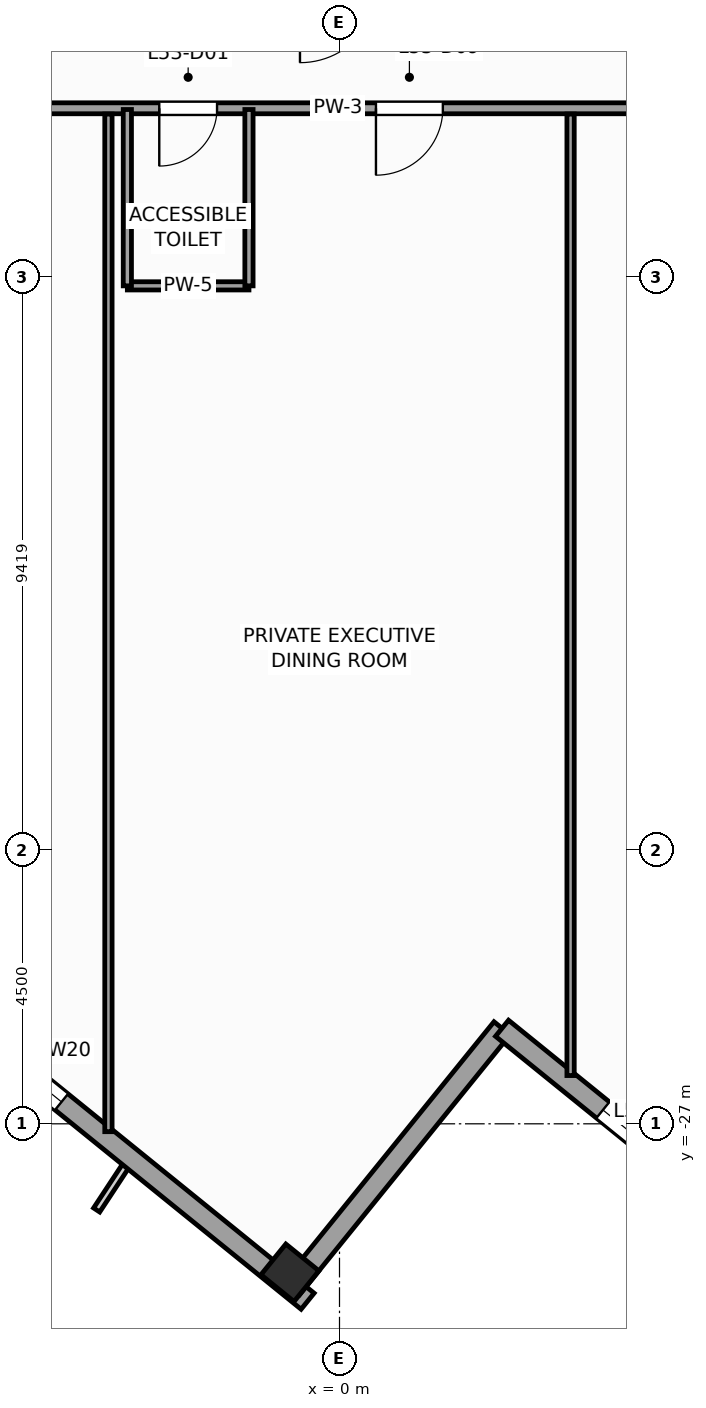
"""IFC4 building model, lengths in metres.
Left out: names, types, materials, properties, quantities, classifications, styles, units other than length and angle.
Written with IfcOpenShell. Run it as: python <this file> out.ifc"""

import sys

from ifc_helpers import new_model, si_unit, direction, frame, frame_2d, origin, origin_2d, place, context, subcontext, project, spatial, rectangle, extrude, source, transform, mapped, element, fill, save


model = new_model("IFC4")
c1 = context("Model", 3, precision=1e-05, world=origin(), true_north=direction((0.0, 1.0)))
c2 = subcontext(c1, "Body", "Model", "MODEL_VIEW")
j1 = project(units=[si_unit("LENGTHUNIT", "METRE"), si_unit("PLANEANGLEUNIT", "RADIAN")], contexts=[c1])
p1 = place(None, origin())
s1 = spatial("IfcSite", under=j1, at=p1, CompositionType="ELEMENT")
p2 = place(p1, origin())
s2 = spatial("IfcBuilding", under=s1, at=p2, CompositionType="ELEMENT")
p3 = place(p2, frame((0.0, 0.0, 221.2)))
s3 = spatial("IfcBuildingStorey", under=s2, at=p3, CompositionType="ELEMENT", Elevation=221.2)
m1 = source(origin(), c2, "Body", "SweptSolid", [
    extrude(rectangle(XDim=0.65, YDim=0.7, at=origin_2d()), origin(), (0.0, 0.0, 1.0), 3.9),
])
p4 = place(p3, frame((-0.815, -29.45, 0.0), z_axis=(0.0, 0.0, 1.0), x_axis=(0.62932039105, 0.777145961457, 0.0)))
e1 = element("IfcColumn", 1, at=p4, inside=s3, PredefinedType="COLUMN", context=c2, shape_type="MappedRepresentation", body=[
    mapped(m1, transform((0.0, 0.0, 0.0), scale=1.0)),
])
p5 = place(p3, frame((-29.154, -6.733, 0.0), z_axis=(0.0, 0.0, 1.0), x_axis=(0.77714192302, -0.629325378072, 0.0)))
e2 = element("IfcWall", 2, at=p5, inside=s3, PredefinedType="STANDARD", context=c2, shape_type="SweptSolid", body=[
    extrude(rectangle(XDim=36.84, YDim=0.34, at=frame_2d((18.42, 0.0))), origin(), (0.0, 0.0, 1.0), 2.96),
])
p6 = place(p5, frame((3.721, 0.0, 0.48)))
e3 = element("IfcOpeningElement", 3, at=p6, cuts=e2, PredefinedType="OPENING", context=c2, shape_type="SweptSolid", body=[
    extrude(rectangle(XDim=1.4, YDim=2.4, at=frame_2d((0.7, 1.2))), frame((0.0, 0.18, 0.0), z_axis=(0.0, -1.0, 0.0), x_axis=(1.0, 0.0, 0.0)), (0.0, 0.0, 1.0), 0.36),
])
p7 = place(p5, frame((9.809, 0.0, 0.58)))
e4 = element("IfcOpeningElement", 4, at=p7, cuts=e2, PredefinedType="OPENING", context=c2, shape_type="SweptSolid", body=[
    extrude(rectangle(XDim=1.75, YDim=2.3, at=frame_2d((0.875, 1.15))), frame((0.0, 0.18, 0.0), z_axis=(0.0, -1.0, 0.0), x_axis=(1.0, 0.0, 0.0)), (0.0, 0.0, 1.0), 0.36),
])
p8 = place(p5, frame((16.058, 0.0, 0.58)))
e5 = element("IfcOpeningElement", 5, at=p8, cuts=e2, PredefinedType="OPENING", context=c2, shape_type="SweptSolid", body=[
    extrude(rectangle(XDim=1.75, YDim=2.3, at=frame_2d((0.875, 1.15))), frame((0.0, 0.18, 0.0), z_axis=(0.0, -1.0, 0.0), x_axis=(1.0, 0.0, 0.0)), (0.0, 0.0, 1.0), 0.36),
])
p9 = place(p5, frame((24.176, 0.0, 0.58)))
e6 = element("IfcOpeningElement", 6, at=p9, cuts=e2, PredefinedType="OPENING", context=c2, shape_type="SweptSolid", body=[
    extrude(rectangle(XDim=1.75, YDim=2.3, at=frame_2d((0.875, 1.15))), frame((0.0, 0.18, 0.0), z_axis=(0.0, -1.0, 0.0), x_axis=(1.0, 0.0, 0.0)), (0.0, 0.0, 1.0), 0.36),
])
p10 = place(p5, frame((30.232, 0.0, 0.48)))
e7 = element("IfcOpeningElement", 7, at=p10, cuts=e2, PredefinedType="OPENING", context=c2, shape_type="SweptSolid", body=[
    extrude(rectangle(XDim=1.4, YDim=2.4, at=frame_2d((0.7, 1.2))), frame((0.0, 0.18, 0.0), z_axis=(0.0, -1.0, 0.0), x_axis=(1.0, 0.0, 0.0)), (0.0, 0.0, 1.0), 0.36),
])
p11 = place(p3, frame((-0.789, -29.703, 0.0), z_axis=(0.0, 0.0, 1.0), x_axis=(0.629323365087, 0.77714355312, 0.0)))
e8 = element("IfcWall", 8, at=p11, inside=s3, PredefinedType="STANDARD", context=c2, shape_type="SweptSolid", body=[
    extrude(rectangle(XDim=5.5, YDim=0.34, at=frame_2d((2.75, 0.0))), origin(), (0.0, 0.0, 1.0), 3.66),
])
p12 = place(p3, frame((2.673, -25.429, 0.0), z_axis=(0.0, 0.0, 1.0), x_axis=(0.777162640055, -0.629299794138, 0.0)))
e9 = element("IfcWall", 9, at=p12, inside=s3, PredefinedType="STANDARD", context=c2, shape_type="SweptSolid", body=[
    extrude(rectangle(XDim=5.67, YDim=0.34, at=frame_2d((2.835, 0.0))), origin(), (0.0, 0.0, 1.0), 3.66),
])
p13 = place(p12, frame((2.135, 0.0, 0.48)))
e10 = element("IfcOpeningElement", 10, at=p13, cuts=e9, PredefinedType="OPENING", context=c2, shape_type="SweptSolid", body=[
    extrude(rectangle(XDim=1.4, YDim=2.4, at=frame_2d((0.7, 1.2))), frame((0.0, 0.18, 0.0), z_axis=(0.0, -1.0, 0.0), x_axis=(1.0, 0.0, 0.0)), (0.0, 0.0, 1.0), 0.36),
])
p14 = place(p3, frame((-11.4, -10.3, 0.0), z_axis=(0.0, 0.0, 1.0), x_axis=(1.0, 0.0, 0.0)))
e11 = element("IfcWall", 11, at=p14, inside=s3, PredefinedType="PARTITIONING", context=c2, shape_type="SweptSolid", body=[
    extrude(rectangle(XDim=22.75, YDim=0.18, at=frame_2d((11.375, 0.0))), origin(), (0.0, 0.0, 1.0), 3.66),
])
p15 = place(p14, frame((8.436, 0.0, 0.0)))
e12 = element("IfcOpeningElement", 12, at=p15, cuts=e11, PredefinedType="OPENING", context=c2, shape_type="SweptSolid", body=[
    extrude(rectangle(XDim=0.95, YDim=2.1, at=frame_2d((0.475, 1.05))), frame((0.0, 0.1, 0.0), z_axis=(0.0, -1.0, 0.0), x_axis=(1.0, 0.0, 0.0)), (0.0, 0.0, 1.0), 0.2),
])
p16 = place(p14, frame((1.58, 0.0, 0.0)))
e13 = element("IfcOpeningElement", 13, at=p16, cuts=e11, PredefinedType="OPENING", context=c2, shape_type="SweptSolid", body=[
    extrude(rectangle(XDim=0.95, YDim=2.1, at=frame_2d((0.475, 1.05))), frame((0.0, 0.1, 0.0), z_axis=(0.0, -1.0, 0.0), x_axis=(1.0, 0.0, 0.0)), (0.0, 0.0, 1.0), 0.2),
])
p17 = place(p14, frame((4.834, 0.0, 0.0)))
e14 = element("IfcOpeningElement", 14, at=p17, cuts=e11, PredefinedType="OPENING", context=c2, shape_type="SweptSolid", body=[
    extrude(rectangle(XDim=1.1, YDim=2.2, at=frame_2d((0.55, 1.1))), frame((0.0, 0.1, 0.0), z_axis=(0.0, -1.0, 0.0), x_axis=(1.0, 0.0, 0.0)), (0.0, 0.0, 1.0), 0.2),
])
p18 = place(p14, frame((12.0, 0.0, 0.0)))
e15 = element("IfcOpeningElement", 15, at=p18, cuts=e11, PredefinedType="OPENING", context=c2, shape_type="SweptSolid", body=[
    extrude(rectangle(XDim=1.1, YDim=2.2, at=frame_2d((0.55, 1.1))), frame((0.0, 0.1, 0.0), z_axis=(0.0, -1.0, 0.0), x_axis=(1.0, 0.0, 0.0)), (0.0, 0.0, 1.0), 0.2),
])
p19 = place(p14, frame((18.041, 0.0, 0.0)))
e16 = element("IfcOpeningElement", 16, at=p19, cuts=e11, PredefinedType="OPENING", context=c2, shape_type="SweptSolid", body=[
    extrude(rectangle(XDim=1.1, YDim=2.2, at=frame_2d((0.55, 1.1))), frame((0.0, 0.1, 0.0), z_axis=(0.0, -1.0, 0.0), x_axis=(1.0, 0.0, 0.0)), (0.0, 0.0, 1.0), 0.2),
])
p20 = place(p3, frame((-3.8, -27.129, 0.0), z_axis=(0.0, 0.0, 1.0), x_axis=(0.0, 1.0, 0.0)))
e17 = element("IfcWall", 17, at=p20, inside=s3, PredefinedType="PARTITIONING", context=c2, shape_type="SweptSolid", body=[
    extrude(rectangle(XDim=16.734, YDim=0.12, at=frame_2d((8.367, 0.0))), origin(), (0.0, 0.0, 1.0), 3.66),
])
p21 = place(p3, frame((3.8, -26.207, 0.0), z_axis=(0.0, 0.0, 1.0), x_axis=(0.0, 1.0, 0.0)))
e18 = element("IfcWall", 18, at=p21, inside=s3, PredefinedType="PARTITIONING", context=c2, shape_type="SweptSolid", body=[
    extrude(rectangle(XDim=15.812, YDim=0.12, at=frame_2d((7.906, 0.0))), origin(), (0.0, 0.0, 1.0), 3.66),
])
p22 = place(p3, frame((-3.489, -13.22, 0.0), z_axis=(0.0, 0.0, 1.0), x_axis=(1.0, 0.0, 0.0)))
e19 = element("IfcWall", 19, at=p22, inside=s3, PredefinedType="PARTITIONING", context=c2, shape_type="SweptSolid", body=[
    extrude(rectangle(XDim=2.0, YDim=0.135, at=frame_2d((1.0, 0.0))), origin(), (0.0, 0.0, 1.0), 2.76),
])
for number, where, z_axis, x_axis in (
    (20, (-1.489, -13.22, 0.0), (0.0, 0.0, 1.0), (0.0, 1.0, 0.0)),
    (21, (-3.489, -13.22, 0.0), (0.0, 0.0, 1.0), (0.0, 1.0, 0.0)),
):
    element("IfcWall", number, at=place(p3, frame(where, z_axis=z_axis, x_axis=x_axis)), inside=s3, PredefinedType="PARTITIONING", context=c2, shape_type="SweptSolid", body=[
        extrude(rectangle(XDim=2.9, YDim=0.135, at=frame_2d((1.45, 0.0))), origin(), (0.0, 0.0, 1.0), 3.66),
    ])
m2 = source(origin(), c2, "Body", "SweptSolid", [
    extrude(rectangle(XDim=1.4, YDim=2.4, at=frame_2d((0.7, 1.2))), frame((0.0, 0.03, 0.0), z_axis=(0.0, -1.0, 0.0), x_axis=(1.0, 0.0, 0.0)), (0.0, 0.0, 1.0), 0.06),
])
p23 = place(p10, origin())
e22 = element("IfcWindow", 22, at=p23, inside=s3, PartitioningType="SINGLE_PANEL", PredefinedType="WINDOW", context=c2, shape_type="MappedRepresentation", body=[
    mapped(m2, transform((0.0, 0.0, 0.0), scale=1.0)),
])
fill(e7, e22)
p24 = place(p13, origin())
e23 = element("IfcWindow", 23, at=p24, inside=s3, PartitioningType="SINGLE_PANEL", PredefinedType="WINDOW", context=c2, shape_type="MappedRepresentation", body=[
    mapped(m2, transform((0.0, 0.0, 0.0), scale=1.0)),
])
fill(e10, e23)
m3 = source(origin(), c2, "Body", "SweptSolid", [
    extrude(rectangle(XDim=0.95, YDim=2.1, at=frame_2d((0.475, 1.05))), frame((0.0, 0.025, 0.0), z_axis=(0.0, -1.0, 0.0), x_axis=(1.0, 0.0, 0.0)), (0.0, 0.0, 1.0), 0.05),
])
p25 = place(p15, frame((0.95, 0.0, 0.0), z_axis=(0.0, 0.0, 1.0), x_axis=(-1.0, 0.0, 0.0)))
e24 = element("IfcDoor", 24, at=p25, inside=s3, OperationType="SINGLE_SWING_LEFT", PredefinedType="DOOR", context=c2, shape_type="MappedRepresentation", body=[
    mapped(m3, transform((0.0, 0.0, 0.0), scale=1.0)),
])
fill(e12, e24)
m4 = source(origin(), c2, "Body", "SweptSolid", [
    extrude(rectangle(XDim=1.1, YDim=2.2, at=frame_2d((0.55, 1.1))), frame((0.0, 0.025, 0.0), z_axis=(0.0, -1.0, 0.0), x_axis=(1.0, 0.0, 0.0)), (0.0, 0.0, 1.0), 0.05),
])
p26 = place(p18, frame((1.1, 0.0, 0.0), z_axis=(0.0, 0.0, 1.0), x_axis=(-1.0, 0.0, 0.0)))
e25 = element("IfcDoor", 25, at=p26, inside=s3, OperationType="SINGLE_SWING_LEFT", PredefinedType="DOOR", context=c2, shape_type="MappedRepresentation", body=[
    mapped(m4, transform((0.0, 0.0, 0.0), scale=1.0)),
])
fill(e15, e25)
save(model, sys.argv[1])
